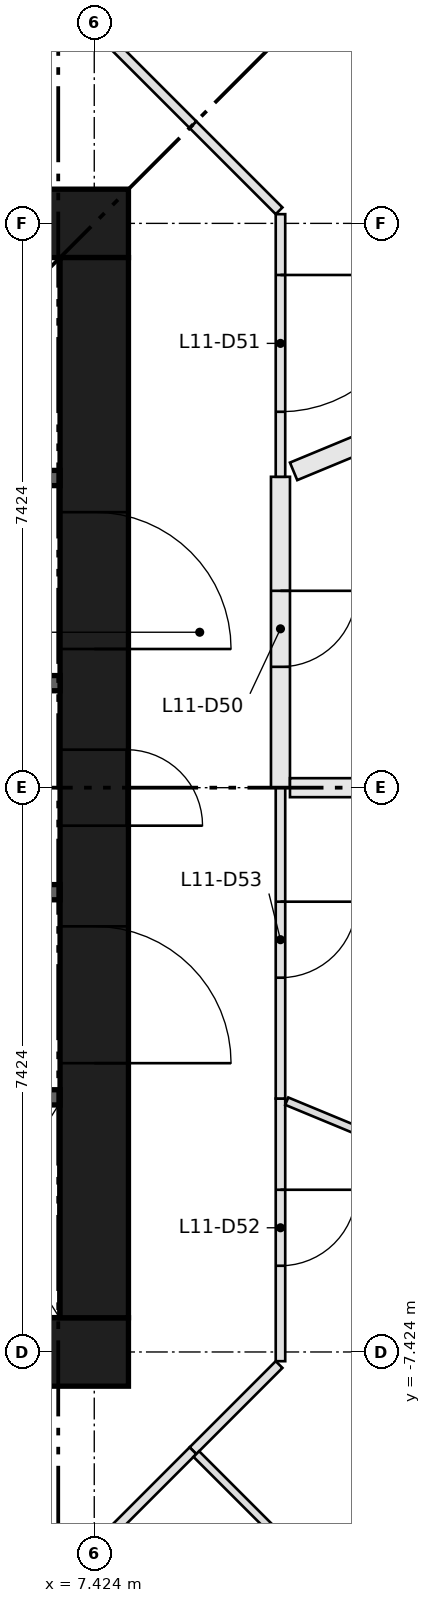
"""IFC4 building model, lengths in metres.
Left out: names, types, materials, properties, quantities, classifications, styles, units other than length and angle.
Written with IfcOpenShell. Run it as: python <this file> out.ifc"""

import sys

from ifc_helpers import new_model, si_unit, direction, frame, frame_2d, origin, place, context, subcontext, project, spatial, rectangle, extrude, element, fill, save


model = new_model("IFC4")
c1 = context("Model", 3, precision=1e-05, world=origin(), true_north=direction((0.0, 1.0)))
c2 = subcontext(c1, "Body", "Model", "MODEL_VIEW")
j1 = project(units=[si_unit("LENGTHUNIT", "METRE"), si_unit("PLANEANGLEUNIT", "RADIAN")], contexts=[c1])
p1 = place(None, origin())
s1 = spatial("IfcSite", under=j1, at=p1, CompositionType="ELEMENT")
p2 = place(p1, origin())
s2 = spatial("IfcBuilding", under=s1, at=p2, CompositionType="ELEMENT")
p3 = place(p2, frame((0.0, 0.0, 44.45)))
s3 = spatial("IfcBuildingStorey", under=s2, at=p3, CompositionType="ELEMENT", Elevation=44.45)
for number, where, z_axis, x_axis in (
    (1, (-7.874, -7.424, 0.0), (0.0, 0.0, 1.0), (1.0, 0.0, 0.0)),
    (2, (-7.874, 7.424, 0.0), (0.0, 0.0, 1.0), (1.0, 0.0, 0.0)),
):
    element("IfcWall", number, at=place(p3, frame(where, z_axis=z_axis, x_axis=x_axis)), inside=s3, PredefinedType="SHEAR", context=c2, shape_type="SweptSolid", body=[
        extrude(rectangle(XDim=15.748, YDim=0.9, at=frame_2d((7.874, 0.0))), origin(), (0.0, 0.0, 1.0), 3.65),
    ])
p4 = place(p3, frame((7.424, -6.974, 0.0), z_axis=(0.0, 0.0, 1.0), x_axis=(0.0, 1.0, 0.0)))
e3 = element("IfcWall", 3, at=p4, inside=s3, PredefinedType="SHEAR", context=c2, shape_type="SweptSolid", body=[
    extrude(rectangle(XDim=13.948, YDim=0.9, at=frame_2d((6.974, 0.0))), origin(), (0.0, 0.0, 1.0), 3.65),
])
p5 = place(p4, frame((6.474, 0.0, 0.0)))
e4 = element("IfcOpeningElement", 4, at=p5, cuts=e3, PredefinedType="OPENING", context=c2, shape_type="SweptSolid", body=[
    extrude(rectangle(XDim=1.0, YDim=2.1, at=frame_2d((0.5, 1.05))), frame((0.0, 0.46, 0.0), z_axis=(0.0, -1.0, 0.0), x_axis=(1.0, 0.0, 0.0)), (0.0, 0.0, 1.0), 0.92),
])
p6 = place(p4, frame((3.35, 0.0, 0.0)))
e5 = element("IfcOpeningElement", 5, at=p6, cuts=e3, PredefinedType="OPENING", context=c2, shape_type="SweptSolid", body=[
    extrude(rectangle(XDim=1.8, YDim=2.1, at=frame_2d((0.9, 1.05))), frame((0.0, 0.46, 0.0), z_axis=(0.0, -1.0, 0.0), x_axis=(1.0, 0.0, 0.0)), (0.0, 0.0, 1.0), 0.92),
])
p7 = place(p4, frame((8.799, 0.0, 0.0)))
e6 = element("IfcOpeningElement", 6, at=p7, cuts=e3, PredefinedType="OPENING", context=c2, shape_type="SweptSolid", body=[
    extrude(rectangle(XDim=1.8, YDim=2.1, at=frame_2d((0.9, 1.05))), frame((0.0, 0.46, 0.0), z_axis=(0.0, -1.0, 0.0), x_axis=(1.0, 0.0, 0.0)), (0.0, 0.0, 1.0), 0.92),
])
p8 = place(p3, frame((-6.974, -4.074, 0.0), z_axis=(0.0, 0.0, 1.0), x_axis=(1.0, 0.0, 0.0)))
e7 = element("IfcWall", 7, at=p8, inside=s3, PredefinedType="SHEAR", context=c2, shape_type="SweptSolid", body=[
    extrude(rectangle(XDim=13.948, YDim=0.2, at=frame_2d((6.974, 0.0))), origin(), (0.0, 0.0, 1.0), 3.3),
])
p9 = place(p8, frame((0.918, 0.0, 0.0)))
e8 = element("IfcOpeningElement", 8, at=p9, cuts=e7, PredefinedType="OPENING", context=c2, shape_type="SweptSolid", body=[
    extrude(rectangle(XDim=1.1, YDim=2.1, at=frame_2d((0.55, 1.05))), frame((0.0, 0.11, 0.0), z_axis=(0.0, -1.0, 0.0), x_axis=(1.0, 0.0, 0.0)), (0.0, 0.0, 1.0), 0.22),
])
p10 = place(p8, frame((4.055, 0.0, 0.0)))
e9 = element("IfcOpeningElement", 9, at=p10, cuts=e7, PredefinedType="OPENING", context=c2, shape_type="SweptSolid", body=[
    extrude(rectangle(XDim=1.1, YDim=2.1, at=frame_2d((0.55, 1.05))), frame((0.0, 0.11, 0.0), z_axis=(0.0, -1.0, 0.0), x_axis=(1.0, 0.0, 0.0)), (0.0, 0.0, 1.0), 0.22),
])
p11 = place(p8, frame((6.658, 0.0, 0.0)))
e10 = element("IfcOpeningElement", 10, at=p11, cuts=e7, PredefinedType="OPENING", context=c2, shape_type="SweptSolid", body=[
    extrude(rectangle(XDim=1.0, YDim=2.1, at=frame_2d((0.5, 1.05))), frame((0.0, 0.11, 0.0), z_axis=(0.0, -1.0, 0.0), x_axis=(1.0, 0.0, 0.0)), (0.0, 0.0, 1.0), 0.22),
])
p12 = place(p8, frame((8.627, 0.0, 0.0)))
e11 = element("IfcOpeningElement", 11, at=p12, cuts=e7, PredefinedType="OPENING", context=c2, shape_type="SweptSolid", body=[
    extrude(rectangle(XDim=1.0, YDim=2.1, at=frame_2d((0.5, 1.05))), frame((0.0, 0.11, 0.0), z_axis=(0.0, -1.0, 0.0), x_axis=(1.0, 0.0, 0.0)), (0.0, 0.0, 1.0), 0.22),
])
p13 = place(p8, frame((10.595, 0.0, 0.0)))
e12 = element("IfcOpeningElement", 12, at=p13, cuts=e7, PredefinedType="OPENING", context=c2, shape_type="SweptSolid", body=[
    extrude(rectangle(XDim=1.0, YDim=2.1, at=frame_2d((0.5, 1.05))), frame((0.0, 0.11, 0.0), z_axis=(0.0, -1.0, 0.0), x_axis=(1.0, 0.0, 0.0)), (0.0, 0.0, 1.0), 0.22),
])
p14 = place(p8, frame((12.564, 0.0, 0.0)))
e13 = element("IfcOpeningElement", 13, at=p14, cuts=e7, PredefinedType="OPENING", context=c2, shape_type="SweptSolid", body=[
    extrude(rectangle(XDim=1.0, YDim=2.1, at=frame_2d((0.5, 1.05))), frame((0.0, 0.11, 0.0), z_axis=(0.0, -1.0, 0.0), x_axis=(1.0, 0.0, 0.0)), (0.0, 0.0, 1.0), 0.22),
])
p15 = place(p3, frame((0.0, 4.074, 0.0), z_axis=(0.0, 0.0, 1.0), x_axis=(1.0, 0.0, 0.0)))
e14 = element("IfcWall", 14, at=p15, inside=s3, PredefinedType="SHEAR", context=c2, shape_type="SweptSolid", body=[
    extrude(rectangle(XDim=6.974, YDim=0.2, at=frame_2d((3.487, 0.0))), origin(), (0.0, 0.0, 1.0), 3.3),
])
p16 = place(p15, frame((0.754, 0.0, 0.0)))
e15 = element("IfcOpeningElement", 15, at=p16, cuts=e14, PredefinedType="OPENING", context=c2, shape_type="SweptSolid", body=[
    extrude(rectangle(XDim=1.0, YDim=2.1, at=frame_2d((0.5, 1.05))), frame((0.0, 0.11, 0.0), z_axis=(0.0, -1.0, 0.0), x_axis=(1.0, 0.0, 0.0)), (0.0, 0.0, 1.0), 0.22),
])
p17 = place(p15, frame((3.407, 0.0, 0.0)))
e16 = element("IfcOpeningElement", 16, at=p17, cuts=e14, PredefinedType="OPENING", context=c2, shape_type="SweptSolid", body=[
    extrude(rectangle(XDim=1.0, YDim=2.1, at=frame_2d((0.5, 1.05))), frame((0.0, 0.11, 0.0), z_axis=(0.0, -1.0, 0.0), x_axis=(1.0, 0.0, 0.0)), (0.0, 0.0, 1.0), 0.22),
])
p18 = place(p15, frame((5.79, 0.0, 0.0)))
e17 = element("IfcOpeningElement", 17, at=p18, cuts=e14, PredefinedType="OPENING", context=c2, shape_type="SweptSolid", body=[
    extrude(rectangle(XDim=0.8, YDim=2.1, at=frame_2d((0.4, 1.05))), frame((0.0, 0.11, 0.0), z_axis=(0.0, -1.0, 0.0), x_axis=(1.0, 0.0, 0.0)), (0.0, 0.0, 1.0), 0.22),
])
for number, where, z_axis, x_axis in (
    (18, (4.374, -1.375, 0.0), (0.0, 0.0, 1.0), (1.0, 0.0, 0.0)),
    (19, (4.374, 1.375, 0.0), (0.0, 0.0, 1.0), (1.0, 0.0, 0.0)),
):
    element("IfcWall", number, at=place(p3, frame(where, z_axis=z_axis, x_axis=x_axis)), inside=s3, PredefinedType="SHEAR", context=c2, shape_type="SweptSolid", body=[
        extrude(rectangle(XDim=2.6, YDim=0.2, at=frame_2d((1.3, 0.0))), origin(), (0.0, 0.0, 1.0), 3.3),
    ])
p19 = place(p3, frame((9.874, 4.09, 0.0), z_axis=(0.0, 0.0, 1.0), x_axis=(0.0, -1.0, 0.0)))
e20 = element("IfcWall", 20, at=p19, inside=s3, PredefinedType="PARTITIONING", context=c2, shape_type="SweptSolid", body=[
    extrude(rectangle(XDim=4.09, YDim=0.25, at=frame_2d((2.045, 0.0))), origin(), (0.0, 0.0, 1.0), 3.3),
])
p20 = place(p19, frame((1.5, 0.0, 0.0)))
e21 = element("IfcOpeningElement", 21, at=p20, cuts=e20, PredefinedType="OPENING", context=c2, shape_type="SweptSolid", body=[
    extrude(rectangle(XDim=1.0, YDim=2.1, at=frame_2d((0.5, 1.05))), frame((0.0, 0.135, 0.0), z_axis=(0.0, -1.0, 0.0), x_axis=(1.0, 0.0, 0.0)), (0.0, 0.0, 1.0), 0.27),
])
p21 = place(p3, frame((8.722, 8.722, 0.0), z_axis=(0.0, 0.0, 1.0), x_axis=(0.70718294931, -0.707030604857, 0.0)))
e22 = element("IfcWall", 22, at=p21, inside=s3, PredefinedType="PARTITIONING", context=c2, shape_type="SweptSolid", body=[
    extrude(rectangle(XDim=1.603, YDim=0.125, at=frame_2d((0.801, 0.0))), origin(), (0.0, 0.0, 1.0), 3.3),
])
p22 = place(p3, frame((9.874, 7.545, 0.0), z_axis=(0.0, 0.0, 1.0), x_axis=(0.0, -1.0, 0.0)))
e23 = element("IfcWall", 23, at=p22, inside=s3, PredefinedType="PARTITIONING", context=c2, shape_type="SweptSolid", body=[
    extrude(rectangle(XDim=3.455, YDim=0.125, at=frame_2d((1.728, 0.0))), origin(), (0.0, 0.0, 1.0), 3.3),
])
p23 = place(p22, frame((0.8, 0.0, 0.0)))
e24 = element("IfcOpeningElement", 24, at=p23, cuts=e23, PredefinedType="OPENING", context=c2, shape_type="SweptSolid", body=[
    extrude(rectangle(XDim=1.8, YDim=2.1, at=frame_2d((0.9, 1.05))), frame((0.0, 0.073, 0.0), z_axis=(0.0, -1.0, 0.0), x_axis=(1.0, 0.0, 0.0)), (0.0, 0.0, 1.0), 0.145),
])
p24 = place(p3, frame((9.856, -7.589, 0.0), z_axis=(0.0, 0.0, 1.0), x_axis=(-0.70718294931, -0.707030604857, 0.0)))
e25 = element("IfcWall", 25, at=p24, inside=s3, PredefinedType="PARTITIONING", context=c2, shape_type="SweptSolid", body=[
    extrude(rectangle(XDim=1.603, YDim=0.125, at=frame_2d((0.801, 0.0))), origin(), (0.0, 0.0, 1.0), 3.3),
])
p25 = place(p3, frame((9.874, -4.09, 0.0), z_axis=(0.0, 0.0, 1.0), x_axis=(0.0, -1.0, 0.0)))
e26 = element("IfcWall", 26, at=p25, inside=s3, PredefinedType="PARTITIONING", context=c2, shape_type="SweptSolid", body=[
    extrude(rectangle(XDim=3.455, YDim=0.125, at=frame_2d((1.728, 0.0))), origin(), (0.0, 0.0, 1.0), 3.3),
])
p26 = place(p25, frame((1.2, 0.0, 0.0)))
e27 = element("IfcOpeningElement", 27, at=p26, cuts=e26, PredefinedType="OPENING", context=c2, shape_type="SweptSolid", body=[
    extrude(rectangle(XDim=1.0, YDim=2.1, at=frame_2d((0.5, 1.05))), frame((0.0, 0.073, 0.0), z_axis=(0.0, -1.0, 0.0), x_axis=(1.0, 0.0, 0.0)), (0.0, 0.0, 1.0), 0.145),
])
p27 = place(p3, frame((9.874, 0.0, 0.0), z_axis=(0.0, 0.0, 1.0), x_axis=(0.0, -1.0, 0.0)))
e28 = element("IfcWall", 28, at=p27, inside=s3, PredefinedType="PARTITIONING", context=c2, shape_type="SweptSolid", body=[
    extrude(rectangle(XDim=4.09, YDim=0.125, at=frame_2d((2.045, 0.0))), origin(), (0.0, 0.0, 1.0), 3.3),
])
p28 = place(p27, frame((1.5, 0.0, 0.0)))
e29 = element("IfcOpeningElement", 29, at=p28, cuts=e28, PredefinedType="OPENING", context=c2, shape_type="SweptSolid", body=[
    extrude(rectangle(XDim=1.0, YDim=2.1, at=frame_2d((0.5, 1.05))), frame((0.0, 0.073, 0.0), z_axis=(0.0, -1.0, 0.0), x_axis=(1.0, 0.0, 0.0)), (0.0, 0.0, 1.0), 0.145),
])
for number, where, z_axis, x_axis in (
    (30, (7.589, 9.856, 0.0), (0.0, 0.0, 1.0), (0.707, -0.707, 0.0)),
    (31, (8.722, -8.722, 0.0), (0.0, 0.0, 1.0), (-0.707, -0.707, 0.0)),
):
    element("IfcWall", number, at=place(p3, frame(where, z_axis=z_axis, x_axis=x_axis)), inside=s3, PredefinedType="PARTITIONING", context=c2, shape_type="SweptSolid", body=[
        extrude(rectangle(XDim=1.603, YDim=0.125, at=frame_2d((0.801, 0.0))), origin(), (0.0, 0.0, 1.0), 3.3),
    ])
p29 = place(p3, frame((10.047, 4.162, 0.0), z_axis=(0.0, 0.0, 1.0), x_axis=(0.92388200997, 0.382677451195, 0.0)))
e32 = element("IfcWall", 32, at=p29, inside=s3, PredefinedType="PARTITIONING", context=c2, shape_type="SweptSolid", body=[
    extrude(rectangle(XDim=2.935, YDim=0.25, at=frame_2d((1.468, 0.0))), origin(), (0.0, 0.0, 1.0), 3.3),
])
p30 = place(p3, frame((13.677, 0.0, 0.0), z_axis=(0.0, 0.0, 1.0), x_axis=(-1.0, 0.0, 0.0)))
e33 = element("IfcWall", 33, at=p30, inside=s3, PredefinedType="PARTITIONING", context=c2, shape_type="SweptSolid", body=[
    extrude(rectangle(XDim=3.677, YDim=0.25, at=frame_2d((1.839, 0.0))), origin(), (0.0, 0.0, 1.0), 3.3),
])
p31 = place(p3, frame((8.767, -8.767, 0.0), z_axis=(0.0, 0.0, 1.0), x_axis=(0.707106781187, -0.707106781187, 0.0)))
e34 = element("IfcWall", 34, at=p31, inside=s3, PredefinedType="PARTITIONING", context=c2, shape_type="SweptSolid", body=[
    extrude(rectangle(XDim=6.082, YDim=0.105, at=frame_2d((3.041, 0.0))), origin(), (0.0, 0.0, 1.0), 3.3),
])
p32 = place(p3, frame((9.957, -4.124, 0.0), z_axis=(0.0, 0.0, 1.0), x_axis=(0.923860842545, -0.382728550819, 0.0)))
e35 = element("IfcWall", 35, at=p32, inside=s3, PredefinedType="PARTITIONING", context=c2, shape_type="SweptSolid", body=[
    extrude(rectangle(XDim=3.033, YDim=0.105, at=frame_2d((1.517, 0.0))), origin(), (0.0, 0.0, 1.0), 3.3),
])
p33 = place(p5, frame((1.0, 0.0, 0.0), z_axis=(0.0, 0.0, 1.0), x_axis=(-1.0, 0.0, 0.0)))
e36 = element("IfcDoor", 36, at=p33, inside=s3, OperationType="SINGLE_SWING_LEFT", PredefinedType="DOOR", context=c2, shape_type="SweptSolid", body=[
    extrude(rectangle(XDim=1.0, YDim=2.1, at=frame_2d((0.5, 1.05))), frame((0.0, 0.45, 0.0), z_axis=(0.0, -1.0, 0.0), x_axis=(1.0, 0.0, 0.0)), (0.0, 0.0, 1.0), 0.05),
])
fill(e4, e36)
p34 = place(p6, frame((1.8, 0.0, 0.0), z_axis=(0.0, 0.0, 1.0), x_axis=(-1.0, 0.0, 0.0)))
e37 = element("IfcDoor", 37, at=p34, inside=s3, OperationType="DOUBLE_DOOR_SINGLE_SWING", PredefinedType="DOOR", context=c2, shape_type="SweptSolid", body=[
    extrude(rectangle(XDim=1.8, YDim=2.1, at=frame_2d((0.9, 1.05))), frame((0.0, 0.025, 0.0), z_axis=(0.0, -1.0, 0.0), x_axis=(1.0, 0.0, 0.0)), (0.0, 0.0, 1.0), 0.05),
])
fill(e5, e37)
p35 = place(p7, frame((1.8, 0.0, 0.0), z_axis=(0.0, 0.0, 1.0), x_axis=(-1.0, 0.0, 0.0)))
e38 = element("IfcDoor", 38, at=p35, inside=s3, OperationType="DOUBLE_DOOR_SINGLE_SWING", PredefinedType="DOOR", context=c2, shape_type="SweptSolid", body=[
    extrude(rectangle(XDim=1.8, YDim=2.1, at=frame_2d((0.9, 1.05))), frame((0.0, 0.025, 0.0), z_axis=(0.0, -1.0, 0.0), x_axis=(1.0, 0.0, 0.0)), (0.0, 0.0, 1.0), 0.05),
])
fill(e6, e38)
p36 = place(p20, origin())
e39 = element("IfcDoor", 39, at=p36, inside=s3, OperationType="SINGLE_SWING_LEFT", PredefinedType="DOOR", context=c2, shape_type="SweptSolid", body=[
    extrude(rectangle(XDim=1.0, YDim=2.1, at=frame_2d((0.5, 1.05))), frame((0.0, 0.025, 0.0), z_axis=(0.0, -1.0, 0.0), x_axis=(1.0, 0.0, 0.0)), (0.0, 0.0, 1.0), 0.05),
])
fill(e21, e39)
p37 = place(p23, origin())
e40 = element("IfcDoor", 40, at=p37, inside=s3, OperationType="DOUBLE_DOOR_SINGLE_SWING", PredefinedType="DOOR", context=c2, shape_type="SweptSolid", body=[
    extrude(rectangle(XDim=1.8, YDim=2.1, at=frame_2d((0.9, 1.05))), frame((0.0, 0.025, 0.0), z_axis=(0.0, -1.0, 0.0), x_axis=(1.0, 0.0, 0.0)), (0.0, 0.0, 1.0), 0.05),
])
fill(e24, e40)
p38 = place(p26, origin())
e41 = element("IfcDoor", 41, at=p38, inside=s3, OperationType="SINGLE_SWING_LEFT", PredefinedType="DOOR", context=c2, shape_type="SweptSolid", body=[
    extrude(rectangle(XDim=1.0, YDim=2.1, at=frame_2d((0.5, 1.05))), frame((0.0, 0.025, 0.0), z_axis=(0.0, -1.0, 0.0), x_axis=(1.0, 0.0, 0.0)), (0.0, 0.0, 1.0), 0.05),
])
fill(e27, e41)
p39 = place(p28, origin())
e42 = element("IfcDoor", 42, at=p39, inside=s3, OperationType="SINGLE_SWING_LEFT", PredefinedType="DOOR", context=c2, shape_type="SweptSolid", body=[
    extrude(rectangle(XDim=1.0, YDim=2.1, at=frame_2d((0.5, 1.05))), frame((0.0, 0.025, 0.0), z_axis=(0.0, -1.0, 0.0), x_axis=(1.0, 0.0, 0.0)), (0.0, 0.0, 1.0), 0.05),
])
fill(e29, e42)
save(model, sys.argv[1])
